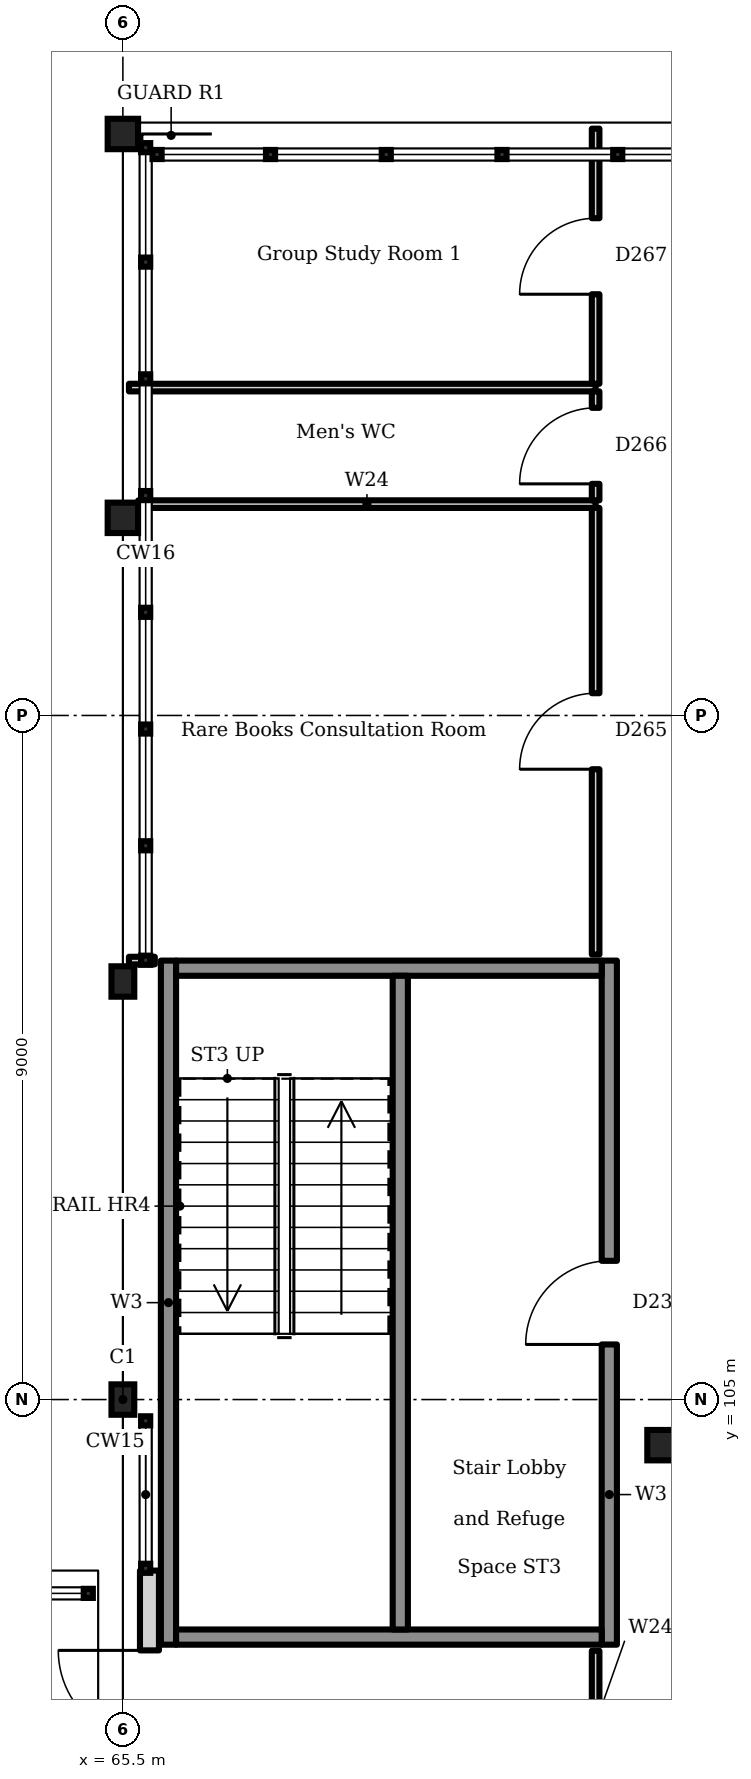
"""IFC4 building model, lengths in metres.
Left out: names, types, materials, properties, quantities, classifications, styles, units other than length and angle.
Written with IfcOpenShell. Run it as: python <this file> out.ifc"""

import sys

from ifc_helpers import new_model, si_unit, direction, frame, frame_2d, origin, origin_2d, place, context, subcontext, project, spatial, rectangle, hollow_circle, i_section, extrude, element, fill, save


model = new_model("IFC4")
c1 = context("Model", 3, precision=1e-05, world=origin(), true_north=direction((0.0, 1.0)))
c2 = subcontext(c1, "Body", "Model", "MODEL_VIEW")
j1 = project(units=[si_unit("LENGTHUNIT", "METRE"), si_unit("PLANEANGLEUNIT", "RADIAN")], contexts=[c1])
p1 = place(None, origin())
s1 = spatial("IfcSite", under=j1, at=p1, CompositionType="ELEMENT")
p2 = place(p1, origin())
s2 = spatial("IfcBuilding", under=s1, at=p2, CompositionType="ELEMENT")
p3 = place(p2, frame((0.0, 0.0, 9.9)))
s3 = spatial("IfcBuildingStorey", under=s2, at=p3, CompositionType="ELEMENT", Elevation=9.9)
for number, where, z_axis, x_axis in (
    (1, (65.5, 105.0, 0.0), (0.0, 0.0, 1.0), (1.0, 0.0, 0.0)),
    (2, (65.5, 110.5, 0.0), (0.0, 0.0, 1.0), (1.0, 0.0, 0.0)),
):
    element("IfcColumn", number, at=place(p3, frame(where, z_axis=z_axis, x_axis=x_axis)), inside=s3, PredefinedType="COLUMN", context=c2, shape_type="SweptSolid", body=[
        extrude(i_section(OverallWidth=0.3, OverallDepth=0.4, WebThickness=0.013, FlangeThickness=0.024, FilletRadius=0.027, at=origin_2d()), origin(), (0.0, 0.0, 1.0), 4.5),
    ])
p4 = place(p3, frame((72.6, 104.4, 0.0), z_axis=(0.0, 0.0, 1.0), x_axis=(1.0, 0.0, 0.0)))
e3 = element("IfcColumn", 3, at=p4, inside=s3, PredefinedType="COLUMN", context=c2, shape_type="SweptSolid", body=[
    extrude(hollow_circle(Radius=0.254, WallThickness=0.016, at=origin_2d()), origin(), (0.0, 0.0, 1.0), 4.5),
])
for number, where, z_axis, x_axis in (
    (4, (65.5, 121.65, 0.0), (0.0, 0.0, 1.0), (1.0, 0.0, 0.0)),
    (5, (65.5, 116.6, 0.0), (0.0, 0.0, 1.0), (1.0, 0.0, 0.0)),
):
    element("IfcColumn", number, at=place(p3, frame(where, z_axis=z_axis, x_axis=x_axis)), inside=s3, PredefinedType="COLUMN", context=c2, shape_type="SweptSolid", body=[
        extrude(hollow_circle(Radius=0.203, WallThickness=0.016, at=origin_2d()), origin(), (0.0, 0.0, 1.0), 4.5),
    ])
p5 = place(p3, frame((65.85, 98.25, 0.0), z_axis=(0.0, 0.0, 1.0), x_axis=(0.0, 1.0, 0.0)))
e6 = element("IfcWall", 6, at=p5, inside=s3, PredefinedType="SOLIDWALL", context=c2, shape_type="SweptSolid", body=[
    extrude(rectangle(XDim=4.5, YDim=0.25, at=frame_2d((2.25, 0.0))), origin(), (0.0, 0.0, 1.0), 4.35),
])
p6 = place(p5, frame((1.05, 0.0, 0.0)))
e7 = element("IfcOpeningElement", 7, at=p6, cuts=e6, PredefinedType="OPENING", context=c2, shape_type="SweptSolid", body=[
    extrude(rectangle(XDim=2.4, YDim=2.4, at=frame_2d((1.2, 1.2))), frame((0.0, 0.135, 0.0), z_axis=(0.0, -1.0, 0.0), x_axis=(1.0, 0.0, 0.0)), (0.0, 0.0, 1.0), 0.27),
])
p7 = place(p3, frame((66.1, 101.775, 0.0), z_axis=(0.0, 0.0, 1.0), x_axis=(0.0, 1.0, 0.0)))
e8 = element("IfcWall", 8, at=p7, inside=s3, PredefinedType="SOLIDWALL", context=c2, shape_type="SweptSolid", body=[
    extrude(rectangle(XDim=9.0, YDim=0.2, at=frame_2d((4.5, 0.0))), origin(), (0.0, 0.0, 1.0), 4.35),
])
p8 = place(p3, frame((71.9, 101.775, 0.0), z_axis=(0.0, 0.0, 1.0), x_axis=(0.0, 1.0, 0.0)))
e9 = element("IfcWall", 9, at=p8, inside=s3, PredefinedType="SOLIDWALL", context=c2, shape_type="SweptSolid", body=[
    extrude(rectangle(XDim=9.0, YDim=0.2, at=frame_2d((4.5, 0.0))), origin(), (0.0, 0.0, 1.0), 4.35),
])
p9 = place(p8, frame((3.95, 0.0, 0.0)))
e10 = element("IfcOpeningElement", 10, at=p9, cuts=e9, PredefinedType="OPENING", context=c2, shape_type="SweptSolid", body=[
    extrude(rectangle(XDim=1.1, YDim=2.1, at=frame_2d((0.55, 1.05))), frame((0.0, 0.11, 0.0), z_axis=(0.0, -1.0, 0.0), x_axis=(1.0, 0.0, 0.0)), (0.0, 0.0, 1.0), 0.22),
])
for number, where, z_axis, x_axis in (
    (11, (66.2, 101.875, 0.0), (0.0, 0.0, 1.0), (1.0, 0.0, 0.0)),
    (12, (66.2, 110.675, 0.0), (0.0, 0.0, 1.0), (1.0, 0.0, 0.0)),
):
    element("IfcWall", number, at=place(p3, frame(where, z_axis=z_axis, x_axis=x_axis)), inside=s3, PredefinedType="SOLIDWALL", context=c2, shape_type="SweptSolid", body=[
        extrude(rectangle(XDim=5.6, YDim=0.2, at=frame_2d((2.8, 0.0))), origin(), (0.0, 0.0, 1.0), 4.35),
    ])
p10 = place(p3, frame((69.15, 101.975, 0.0), z_axis=(0.0, 0.0, 1.0), x_axis=(0.0, 1.0, 0.0)))
e13 = element("IfcWall", 13, at=p10, inside=s3, PredefinedType="SOLIDWALL", context=c2, shape_type="SweptSolid", body=[
    extrude(rectangle(XDim=8.6, YDim=0.2, at=frame_2d((4.3, 0.0))), origin(), (0.0, 0.0, 1.0), 4.35),
])
p11 = place(p3, frame((71.72, 101.695, 0.0), z_axis=(0.0, 0.0, 1.0), x_axis=(0.0, -1.0, 0.0)))
e14 = element("IfcWall", 14, at=p11, inside=s3, PredefinedType="PARTITIONING", context=c2, shape_type="SweptSolid", body=[
    extrude(rectangle(XDim=5.615, YDim=0.1, at=frame_2d((2.808, 0.0))), origin(), (0.0, 0.0, 1.0), 4.35),
])
p12 = place(p11, frame((1.907, 0.0, 0.0)))
e15 = element("IfcOpeningElement", 15, at=p12, cuts=e14, PredefinedType="OPENING", context=c2, shape_type="SweptSolid", body=[
    extrude(rectangle(XDim=1.8, YDim=2.1, at=frame_2d((0.9, 1.05))), frame((0.0, 0.06, 0.0), z_axis=(0.0, -1.0, 0.0), x_axis=(1.0, 0.0, 0.0)), (0.0, 0.0, 1.0), 0.12),
])
p13 = place(p3, frame((65.703, 116.781, 0.0), z_axis=(0.0, 0.0, 1.0), x_axis=(1.0, 0.0, 0.0)))
e16 = element("IfcWall", 16, at=p13, inside=s3, PredefinedType="PARTITIONING", context=c2, shape_type="SweptSolid", body=[
    extrude(rectangle(XDim=6.017, YDim=0.1, at=frame_2d((3.008, 0.0))), origin(), (0.0, 0.0, 1.0), 3.85),
])
p14 = place(p3, frame((71.72, 116.73, 0.0), z_axis=(0.0, 0.0, 1.0), x_axis=(0.0, -1.0, 0.0)))
e17 = element("IfcWall", 17, at=p14, inside=s3, PredefinedType="PARTITIONING", context=c2, shape_type="SweptSolid", body=[
    extrude(rectangle(XDim=5.875, YDim=0.1, at=frame_2d((2.938, 0.0))), origin(), (0.0, 0.0, 1.0), 4.35),
])
p15 = place(p14, frame((2.438, 0.0, 0.0)))
e18 = element("IfcOpeningElement", 18, at=p15, cuts=e17, PredefinedType="OPENING", context=c2, shape_type="SweptSolid", body=[
    extrude(rectangle(XDim=1.0, YDim=2.1, at=frame_2d((0.5, 1.05))), frame((0.0, 0.06, 0.0), z_axis=(0.0, -1.0, 0.0), x_axis=(1.0, 0.0, 0.0)), (0.0, 0.0, 1.0), 0.12),
])
p16 = place(p3, frame((65.92, 110.775, 0.0), z_axis=(0.0, 0.0, 1.0), x_axis=(-1.0, 0.0, 0.0)))
e19 = element("IfcWall", 19, at=p16, inside=s3, PredefinedType="PARTITIONING", context=c2, shape_type="SweptSolid", body=[
    extrude(rectangle(XDim=0.34, YDim=0.1, at=frame_2d((0.17, 0.0))), origin(), (0.0, 0.0, 1.0), 4.04),
])
p17 = place(p3, frame((65.58, 118.314, 0.0), z_axis=(0.0, 0.0, 1.0), x_axis=(1.0, 0.0, 0.0)))
e20 = element("IfcWall", 20, at=p17, inside=s3, PredefinedType="PARTITIONING", context=c2, shape_type="SweptSolid", body=[
    extrude(rectangle(XDim=6.14, YDim=0.1, at=frame_2d((3.07, 0.0))), origin(), (0.0, 0.0, 1.0), 3.85),
])
p18 = place(p3, frame((71.72, 118.264, 0.0), z_axis=(0.0, 0.0, 1.0), x_axis=(0.0, -1.0, 0.0)))
e21 = element("IfcWall", 21, at=p18, inside=s3, PredefinedType="PARTITIONING", context=c2, shape_type="SweptSolid", body=[
    extrude(rectangle(XDim=1.433, YDim=0.1, at=frame_2d((0.717, 0.0))), origin(), (0.0, 0.0, 1.0), 4.35),
])
p19 = place(p18, frame((0.217, 0.0, 0.0)))
e22 = element("IfcOpeningElement", 22, at=p19, cuts=e21, PredefinedType="OPENING", context=c2, shape_type="SweptSolid", body=[
    extrude(rectangle(XDim=1.0, YDim=2.1, at=frame_2d((0.5, 1.05))), frame((0.0, 0.06, 0.0), z_axis=(0.0, -1.0, 0.0), x_axis=(1.0, 0.0, 0.0)), (0.0, 0.0, 1.0), 0.12),
])
p20 = place(p3, frame((71.72, 121.72, 0.0), z_axis=(0.0, 0.0, 1.0), x_axis=(0.0, -1.0, 0.0)))
e23 = element("IfcWall", 23, at=p20, inside=s3, PredefinedType="PARTITIONING", context=c2, shape_type="SweptSolid", body=[
    extrude(rectangle(XDim=3.356, YDim=0.1, at=frame_2d((1.678, 0.0))), origin(), (0.0, 0.0, 1.0), 3.95),
])
p21 = place(p20, frame((1.178, 0.0, 0.0)))
e24 = element("IfcOpeningElement", 24, at=p21, cuts=e23, PredefinedType="OPENING", context=c2, shape_type="SweptSolid", body=[
    extrude(rectangle(XDim=1.0, YDim=2.1, at=frame_2d((0.5, 1.05))), frame((0.0, 0.06, 0.0), z_axis=(0.0, -1.0, 0.0), x_axis=(1.0, 0.0, 0.0)), (0.0, 0.0, 1.0), 0.12),
])
p22 = place(p6, origin())
e25 = element("IfcDoor", 25, at=p22, inside=s3, OperationType="DOUBLE_DOOR_SINGLE_SWING", PredefinedType="DOOR", context=c2, shape_type="SweptSolid", body=[
    extrude(rectangle(XDim=2.4, YDim=2.4, at=frame_2d((1.2, 1.2))), frame((0.0, 0.025, 0.0), z_axis=(0.0, -1.0, 0.0), x_axis=(1.0, 0.0, 0.0)), (0.0, 0.0, 1.0), 0.05),
])
fill(e7, e25)
p23 = place(p9, origin())
e26 = element("IfcDoor", 26, at=p23, inside=s3, OperationType="SINGLE_SWING_RIGHT", PredefinedType="DOOR", context=c2, shape_type="SweptSolid", body=[
    extrude(rectangle(XDim=1.1, YDim=2.1, at=frame_2d((0.55, 1.05))), frame((0.0, 0.025, 0.0), z_axis=(0.0, -1.0, 0.0), x_axis=(1.0, 0.0, 0.0)), (0.0, 0.0, 1.0), 0.05),
])
fill(e10, e26)
p24 = place(p15, frame((1.0, 0.0, 0.0), z_axis=(0.0, 0.0, 1.0), x_axis=(-1.0, 0.0, 0.0)))
e27 = element("IfcDoor", 27, at=p24, inside=s3, OperationType="SINGLE_SWING_RIGHT", PredefinedType="DOOR", context=c2, shape_type="SweptSolid", body=[
    extrude(rectangle(XDim=1.0, YDim=2.1, at=frame_2d((0.5, 1.05))), frame((0.0, 0.025, 0.0), z_axis=(0.0, -1.0, 0.0), x_axis=(1.0, 0.0, 0.0)), (0.0, 0.0, 1.0), 0.05),
])
fill(e18, e27)
p25 = place(p19, frame((1.0, 0.0, 0.0), z_axis=(0.0, 0.0, 1.0), x_axis=(-1.0, 0.0, 0.0)))
e28 = element("IfcDoor", 28, at=p25, inside=s3, OperationType="SINGLE_SWING_RIGHT", PredefinedType="DOOR", context=c2, shape_type="SweptSolid", body=[
    extrude(rectangle(XDim=1.0, YDim=2.1, at=frame_2d((0.5, 1.05))), frame((0.0, 0.025, 0.0), z_axis=(0.0, -1.0, 0.0), x_axis=(1.0, 0.0, 0.0)), (0.0, 0.0, 1.0), 0.05),
])
fill(e22, e28)
p26 = place(p21, frame((1.0, 0.0, 0.0), z_axis=(0.0, 0.0, 1.0), x_axis=(-1.0, 0.0, 0.0)))
e29 = element("IfcDoor", 29, at=p26, inside=s3, OperationType="SINGLE_SWING_RIGHT", PredefinedType="DOOR", context=c2, shape_type="SweptSolid", body=[
    extrude(rectangle(XDim=1.0, YDim=2.1, at=frame_2d((0.5, 1.05))), frame((0.0, 0.025, 0.0), z_axis=(0.0, -1.0, 0.0), x_axis=(1.0, 0.0, 0.0)), (0.0, 0.0, 1.0), 0.05),
])
fill(e24, e29)
save(model, sys.argv[1])
